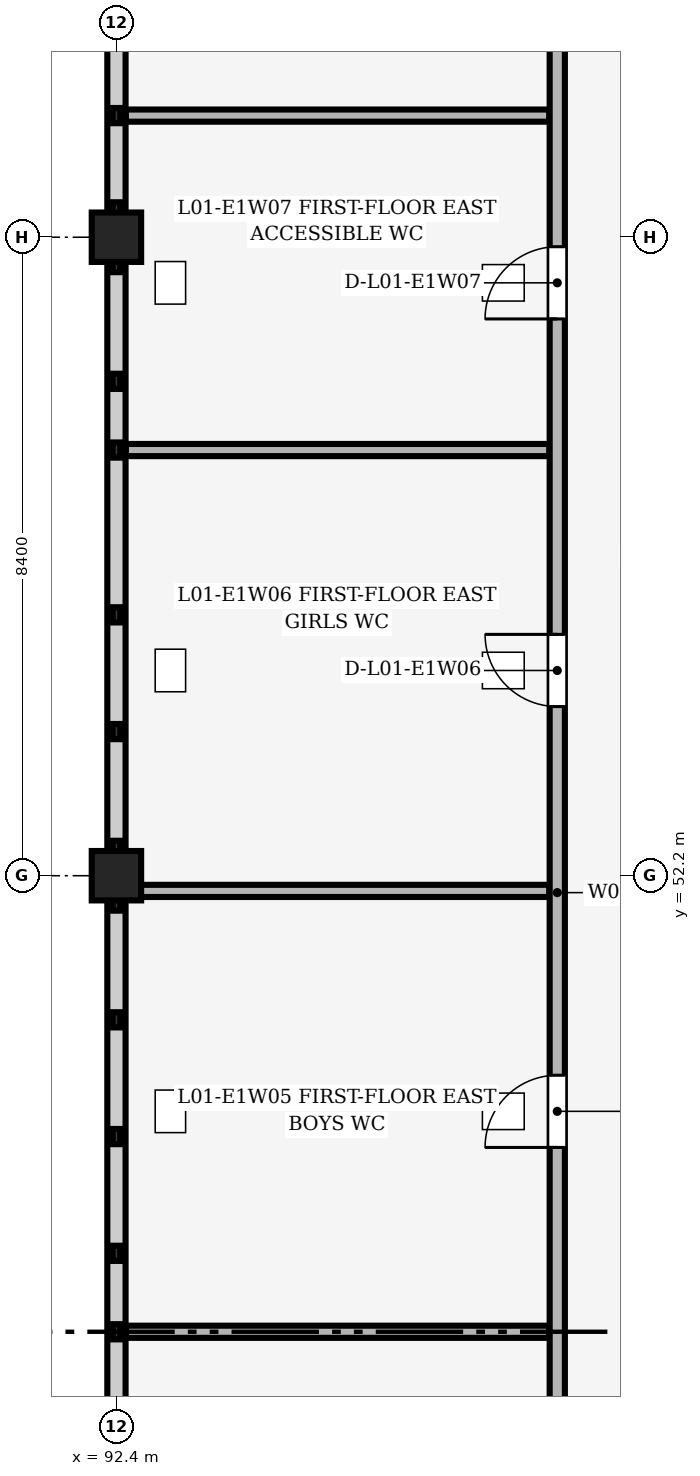
"""IFC4 building model, lengths in metres.
Left out: names, types, materials, properties, quantities, classifications, styles, units other than length and angle.
Written with IfcOpenShell. Run it as: python <this file> out.ifc"""

import sys

from ifc_helpers import new_model, si_unit, direction, frame, frame_2d, origin, origin_2d, place, context, subcontext, project, spatial, rectangle, extrude, element, fill, save


model = new_model("IFC4")
c1 = context("Model", 3, precision=1e-05, world=origin(), true_north=direction((0.0, 1.0)))
c2 = subcontext(c1, "Body", "Model", "MODEL_VIEW")
j1 = project(units=[si_unit("LENGTHUNIT", "METRE"), si_unit("PLANEANGLEUNIT", "RADIAN")], contexts=[c1])
p1 = place(None, origin())
s1 = spatial("IfcSite", under=j1, at=p1, CompositionType="ELEMENT")
p2 = place(p1, origin())
s2 = spatial("IfcBuilding", under=s1, at=p2, CompositionType="ELEMENT")
p3 = place(p2, frame((0.0, 0.0, 4.8)))
s3 = spatial("IfcBuildingStorey", under=s2, at=p3, CompositionType="ELEMENT", Elevation=4.8)
for number, where, z_axis, x_axis in (
    (1, (92.4, 52.2, 0.0), (0.0, 0.0, 1.0), (1.0, 0.0, 0.0)),
    (2, (92.4, 60.6, 0.0), (0.0, 0.0, 1.0), (1.0, 0.0, 0.0)),
):
    element("IfcColumn", number, at=place(p3, frame(where, z_axis=z_axis, x_axis=x_axis)), inside=s3, PredefinedType="COLUMN", context=c2, shape_type="SweptSolid", body=[
        extrude(rectangle(XDim=0.65, YDim=0.65, at=origin_2d()), origin(), (0.0, 0.0, 1.0), 4.2),
    ])
p4 = place(p3, frame((92.4, 44.1, 0.0), z_axis=(0.0, 0.0, 1.0), x_axis=(0.0, 1.0, 0.0)))
e3 = element("IfcWall", 3, at=p4, inside=s3, PredefinedType="SOLIDWALL", context=c2, shape_type="SweptSolid", body=[
    extrude(rectangle(XDim=7.8, YDim=0.24, at=frame_2d((3.9, 0.0))), origin(), (0.0, 0.0, 1.0), 1.15),
])
for number, where, z_axis, x_axis in (
    (4, (92.4, 52.5, 0.0), (0.0, 0.0, 1.0), (0.0, 1.0, 0.0)),
    (5, (92.4, 60.9, 0.0), (0.0, 0.0, 1.0), (0.0, 1.0, 0.0)),
):
    element("IfcWall", number, at=place(p3, frame(where, z_axis=z_axis, x_axis=x_axis)), inside=s3, PredefinedType="SOLIDWALL", context=c2, shape_type="SweptSolid", body=[
        extrude(rectangle(XDim=7.8, YDim=0.24, at=frame_2d((3.9, 0.0))), origin(), (0.0, 0.0, 1.0), 1.15),
    ])
p5 = place(p3, frame((92.525, 46.2, 0.0), z_axis=(0.0, 0.0, 1.0), x_axis=(1.0, 0.0, 0.0)))
e6 = element("IfcWall", 6, at=p5, inside=s3, PredefinedType="PARTITIONING", context=c2, shape_type="SweptSolid", body=[
    extrude(rectangle(XDim=5.57, YDim=0.16, at=frame_2d((2.785, 0.0))), origin(), (0.0, 0.0, 1.0), 3.42),
])
p6 = place(p3, frame((92.525, 52.0, 0.0), z_axis=(0.0, 0.0, 1.0), x_axis=(1.0, 0.0, 0.0)))
e7 = element("IfcWall", 7, at=p6, inside=s3, PredefinedType="PARTITIONING", context=c2, shape_type="SweptSolid", body=[
    extrude(rectangle(XDim=5.57, YDim=0.16, at=frame_2d((2.785, 0.0))), origin(), (0.0, 0.0, 1.0), 3.1),
])
p7 = place(p3, frame((92.525, 57.8, 0.0), z_axis=(0.0, 0.0, 1.0), x_axis=(1.0, 0.0, 0.0)))
e8 = element("IfcWall", 8, at=p7, inside=s3, PredefinedType="PARTITIONING", context=c2, shape_type="SweptSolid", body=[
    extrude(rectangle(XDim=5.57, YDim=0.16, at=frame_2d((2.785, 0.0))), origin(), (0.0, 0.0, 1.0), 3.42),
])
p8 = place(p3, frame((92.525, 62.2, 0.0), z_axis=(0.0, 0.0, 1.0), x_axis=(1.0, 0.0, 0.0)))
e9 = element("IfcWall", 9, at=p8, inside=s3, PredefinedType="PARTITIONING", context=c2, shape_type="SweptSolid", body=[
    extrude(rectangle(XDim=5.57, YDim=0.16, at=frame_2d((2.785, 0.0))), origin(), (0.0, 0.0, 1.0), 3.9),
])
p9 = place(p3, frame((98.2, 18.165, 0.0), z_axis=(0.0, 0.0, 1.0), x_axis=(0.0, 1.0, 0.0)))
e10 = element("IfcWall", 10, at=p9, inside=s3, PredefinedType="PARTITIONING", context=c2, shape_type="SweptSolid", body=[
    extrude(rectangle(XDim=67.625, YDim=0.2, at=frame_2d((33.812, 0.0))), origin(), (0.0, 0.0, 1.0), 3.9),
])
p10 = place(p9, frame((2.035, 0.0, 0.0)))
e11 = element("IfcOpeningElement", 11, at=p10, cuts=e10, PredefinedType="OPENING", context=c2, shape_type="SweptSolid", body=[
    extrude(rectangle(XDim=1.0, YDim=2.15, at=frame_2d((0.5, 1.075))), frame((0.0, 0.11, 0.0), z_axis=(0.0, -1.0, 0.0), x_axis=(1.0, 0.0, 0.0)), (0.0, 0.0, 1.0), 0.22),
])
p11 = place(p9, frame((5.885, 0.0, 0.0)))
e12 = element("IfcOpeningElement", 12, at=p11, cuts=e10, PredefinedType="OPENING", context=c2, shape_type="SweptSolid", body=[
    extrude(rectangle(XDim=1.5, YDim=2.2, at=frame_2d((0.75, 1.1))), frame((0.0, 0.11, 0.0), z_axis=(0.0, -1.0, 0.0), x_axis=(1.0, 0.0, 0.0)), (0.0, 0.0, 1.0), 0.22),
])
p12 = place(p9, frame((13.335, 0.0, 0.0)))
e13 = element("IfcOpeningElement", 13, at=p12, cuts=e10, PredefinedType="OPENING", context=c2, shape_type="SweptSolid", body=[
    extrude(rectangle(XDim=1.0, YDim=2.15, at=frame_2d((0.5, 1.075))), frame((0.0, 0.11, 0.0), z_axis=(0.0, -1.0, 0.0), x_axis=(1.0, 0.0, 0.0)), (0.0, 0.0, 1.0), 0.22),
])
p13 = place(p9, frame((23.335, 0.0, 0.0)))
e14 = element("IfcOpeningElement", 14, at=p13, cuts=e10, PredefinedType="OPENING", context=c2, shape_type="SweptSolid", body=[
    extrude(rectangle(XDim=1.0, YDim=2.15, at=frame_2d((0.5, 1.075))), frame((0.0, 0.11, 0.0), z_axis=(0.0, -1.0, 0.0), x_axis=(1.0, 0.0, 0.0)), (0.0, 0.0, 1.0), 0.22),
])
p14 = place(p9, frame((30.46, 0.0, 0.0)))
e15 = element("IfcOpeningElement", 15, at=p14, cuts=e10, PredefinedType="OPENING", context=c2, shape_type="SweptSolid", body=[
    extrude(rectangle(XDim=0.95, YDim=2.2, at=frame_2d((0.475, 1.1))), frame((0.0, 0.11, 0.0), z_axis=(0.0, -1.0, 0.0), x_axis=(1.0, 0.0, 0.0)), (0.0, 0.0, 1.0), 0.22),
])
p15 = place(p9, frame((36.26, 0.0, 0.0)))
e16 = element("IfcOpeningElement", 16, at=p15, cuts=e10, PredefinedType="OPENING", context=c2, shape_type="SweptSolid", body=[
    extrude(rectangle(XDim=0.95, YDim=2.2, at=frame_2d((0.475, 1.1))), frame((0.0, 0.11, 0.0), z_axis=(0.0, -1.0, 0.0), x_axis=(1.0, 0.0, 0.0)), (0.0, 0.0, 1.0), 0.22),
])
p16 = place(p9, frame((41.36, 0.0, 0.0)))
e17 = element("IfcOpeningElement", 17, at=p16, cuts=e10, PredefinedType="OPENING", context=c2, shape_type="SweptSolid", body=[
    extrude(rectangle(XDim=0.95, YDim=2.1, at=frame_2d((0.475, 1.05))), frame((0.0, 0.11, 0.0), z_axis=(0.0, -1.0, 0.0), x_axis=(1.0, 0.0, 0.0)), (0.0, 0.0, 1.0), 0.22),
])
p17 = place(p9, frame((49.735, 0.0, 0.0)))
e18 = element("IfcOpeningElement", 18, at=p17, cuts=e10, PredefinedType="OPENING", context=c2, shape_type="SweptSolid", body=[
    extrude(rectangle(XDim=1.0, YDim=2.15, at=frame_2d((0.5, 1.075))), frame((0.0, 0.11, 0.0), z_axis=(0.0, -1.0, 0.0), x_axis=(1.0, 0.0, 0.0)), (0.0, 0.0, 1.0), 0.22),
])
p18 = place(p9, frame((61.535, 0.0, 0.0)))
e19 = element("IfcOpeningElement", 19, at=p18, cuts=e10, PredefinedType="OPENING", context=c2, shape_type="SweptSolid", body=[
    extrude(rectangle(XDim=1.0, YDim=2.15, at=frame_2d((0.5, 1.075))), frame((0.0, 0.11, 0.0), z_axis=(0.0, -1.0, 0.0), x_axis=(1.0, 0.0, 0.0)), (0.0, 0.0, 1.0), 0.22),
])
p19 = place(p14, origin())
e20 = element("IfcDoor", 20, at=p19, inside=s3, OperationType="SINGLE_SWING_LEFT", PredefinedType="DOOR", context=c2, shape_type="SweptSolid", body=[
    extrude(rectangle(XDim=0.95, YDim=2.2, at=frame_2d((0.475, 1.1))), frame((0.0, 0.025, 0.0), z_axis=(0.0, -1.0, 0.0), x_axis=(1.0, 0.0, 0.0)), (0.0, 0.0, 1.0), 0.05),
])
fill(e15, e20)
p20 = place(p15, origin())
e21 = element("IfcDoor", 21, at=p20, inside=s3, OperationType="SINGLE_SWING_RIGHT", PredefinedType="DOOR", context=c2, shape_type="SweptSolid", body=[
    extrude(rectangle(XDim=0.95, YDim=2.2, at=frame_2d((0.475, 1.1))), frame((0.0, 0.025, 0.0), z_axis=(0.0, -1.0, 0.0), x_axis=(1.0, 0.0, 0.0)), (0.0, 0.0, 1.0), 0.05),
])
fill(e16, e21)
p21 = place(p16, origin())
e22 = element("IfcDoor", 22, at=p21, inside=s3, OperationType="SINGLE_SWING_LEFT", PredefinedType="DOOR", context=c2, shape_type="SweptSolid", body=[
    extrude(rectangle(XDim=0.95, YDim=2.1, at=frame_2d((0.475, 1.05))), frame((0.0, 0.025, 0.0), z_axis=(0.0, -1.0, 0.0), x_axis=(1.0, 0.0, 0.0)), (0.0, 0.0, 1.0), 0.05),
])
fill(e17, e22)
save(model, sys.argv[1])
